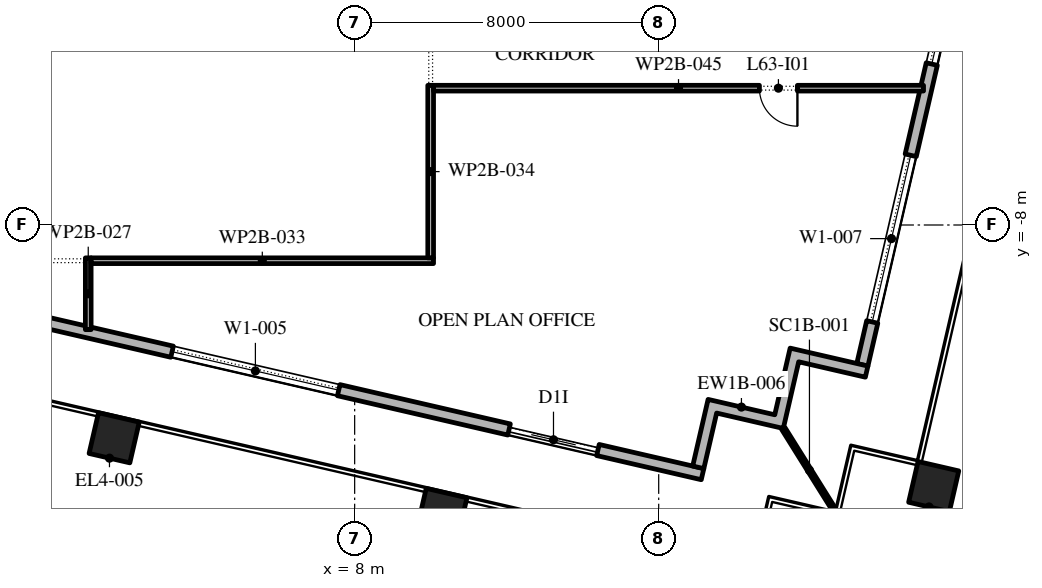
"""IFC4 building model, lengths in metres.
Left out: names, types, materials, properties, quantities, classifications, styles, units other than length and angle.
Written with IfcOpenShell. Run it as: python <this file> out.ifc"""

import sys

from ifc_helpers import new_model, si_unit, direction, frame, frame_2d, origin, origin_2d, place, context, subcontext, project, spatial, polyline, rectangle, outline, extrude, element, fill, save


model = new_model("IFC4")
c1 = context("Model", 3, precision=1e-05, world=origin(), true_north=direction((0.0, 1.0)))
c2 = subcontext(c1, "Body", "Model", "MODEL_VIEW")
j1 = project(units=[si_unit("LENGTHUNIT", "METRE"), si_unit("PLANEANGLEUNIT", "RADIAN")], contexts=[c1])
p1 = place(None, origin())
s1 = spatial("IfcSite", under=j1, at=p1, CompositionType="ELEMENT")
p2 = place(p1, origin())
s2 = spatial("IfcBuilding", under=s1, at=p2, CompositionType="ELEMENT")
p3 = place(p2, frame((0.0, 0.0, 289.2)))
s3 = spatial("IfcBuildingStorey", under=s2, at=p3, CompositionType="ELEMENT", Elevation=289.2)
for number, where, z_axis, x_axis in (
    (1, (1.672, -13.599, 0.0), (0.0, 0.0, 1.0), (0.974, -0.225, 0.0)),
    (2, (10.295, -15.59, 0.0), (0.0, 0.0, 1.0), (0.974, -0.225, 0.0)),
    (3, (23.236, -14.883, 0.0), (0.0, 0.0, 1.0), (0.974, -0.225, 0.0)),
):
    element("IfcColumn", number, at=place(p3, frame(where, z_axis=z_axis, x_axis=x_axis)), inside=s3, PredefinedType="COLUMN", context=c2, shape_type="SweptSolid", body=[
        extrude(rectangle(XDim=1.1, YDim=1.1, at=origin_2d()), origin(), (0.0, 0.0, 1.0), 4.2),
    ])
p4 = place(p3, frame((-29.616, -3.758, 0.0), z_axis=(0.0, 0.0, 1.0), x_axis=(0.974370532314, -0.224949029246, 0.0)))
e4 = element("IfcWall", 4, at=p4, inside=s3, PredefinedType="STANDARD", context=c2, shape_type="SweptSolid", body=[
    extrude(rectangle(XDim=48.0, YDim=0.3, at=frame_2d((24.0, 0.0))), origin(), (0.0, 0.0, 1.0), 3.95),
])
p5 = place(p4, frame((1.625, 0.0, 0.45)))
e5 = element("IfcOpeningElement", 5, at=p5, cuts=e4, PredefinedType="OPENING", context=c2, shape_type="SweptSolid", body=[
    extrude(rectangle(XDim=4.5, YDim=3.05, at=frame_2d((2.25, 1.525))), frame((0.0, 0.16, 0.0), z_axis=(0.0, -1.0, 0.0), x_axis=(1.0, 0.0, 0.0)), (0.0, 0.0, 1.0), 0.32),
])
p6 = place(p4, frame((10.575, 0.0, 0.0)))
e6 = element("IfcOpeningElement", 6, at=p6, cuts=e4, PredefinedType="OPENING", context=c2, shape_type="SweptSolid", body=[
    extrude(rectangle(XDim=2.4, YDim=3.5, at=frame_2d((1.2, 1.75))), frame((0.0, 0.16, 0.0), z_axis=(0.0, -1.0, 0.0), x_axis=(1.0, 0.0, 0.0)), (0.0, 0.0, 1.0), 0.32),
])
p7 = place(p4, frame((17.575, 0.0, 0.45)))
e7 = element("IfcOpeningElement", 7, at=p7, cuts=e4, PredefinedType="OPENING", context=c2, shape_type="SweptSolid", body=[
    extrude(rectangle(XDim=4.5, YDim=3.05, at=frame_2d((2.25, 1.525))), frame((0.0, 0.16, 0.0), z_axis=(0.0, -1.0, 0.0), x_axis=(1.0, 0.0, 0.0)), (0.0, 0.0, 1.0), 0.32),
])
p8 = place(p4, frame((25.625, 0.0, 0.45)))
e8 = element("IfcOpeningElement", 8, at=p8, cuts=e4, PredefinedType="OPENING", context=c2, shape_type="SweptSolid", body=[
    extrude(rectangle(XDim=4.5, YDim=2.9, at=frame_2d((2.25, 1.45))), frame((0.0, 0.16, 0.0), z_axis=(0.0, -1.0, 0.0), x_axis=(1.0, 0.0, 0.0)), (0.0, 0.0, 1.0), 0.32),
])
p9 = place(p4, frame((33.675, 0.0, 0.45)))
e9 = element("IfcOpeningElement", 9, at=p9, cuts=e4, PredefinedType="OPENING", context=c2, shape_type="SweptSolid", body=[
    extrude(rectangle(XDim=4.5, YDim=3.05, at=frame_2d((2.25, 1.525))), frame((0.0, 0.16, 0.0), z_axis=(0.0, -1.0, 0.0), x_axis=(1.0, 0.0, 0.0)), (0.0, 0.0, 1.0), 0.32),
])
p10 = place(p4, frame((42.775, 0.0, 0.0)))
e10 = element("IfcOpeningElement", 10, at=p10, cuts=e4, PredefinedType="OPENING", context=c2, shape_type="SweptSolid", body=[
    extrude(rectangle(XDim=2.4, YDim=3.15, at=frame_2d((1.2, 1.575))), frame((0.0, 0.16, 0.0), z_axis=(0.0, -1.0, 0.0), x_axis=(1.0, 0.0, 0.0)), (0.0, 0.0, 1.0), 0.32),
])
p11 = place(p3, frame((21.359, -11.678, 0.0), z_axis=(0.0, 0.0, 1.0), x_axis=(0.224949198343, 0.974370493275, 0.0)))
e11 = element("IfcWall", 11, at=p11, inside=s3, PredefinedType="STANDARD", context=c2, shape_type="SweptSolid", body=[
    extrude(rectangle(XDim=49.5, YDim=0.3, at=frame_2d((24.75, 0.0))), origin(), (0.0, 0.0, 1.0), 3.95),
])
p12 = place(p11, frame((1.157, 0.0, 0.45)))
e12 = element("IfcOpeningElement", 12, at=p12, cuts=e11, PredefinedType="OPENING", context=c2, shape_type="SweptSolid", body=[
    extrude(rectangle(XDim=4.5, YDim=3.05, at=frame_2d((2.25, 1.525))), frame((0.0, 0.16, 0.0), z_axis=(0.0, -1.0, 0.0), x_axis=(1.0, 0.0, 0.0)), (0.0, 0.0, 1.0), 0.32),
])
p13 = place(p11, frame((8.121, 0.0, 0.45)))
e13 = element("IfcOpeningElement", 13, at=p13, cuts=e11, PredefinedType="OPENING", context=c2, shape_type="SweptSolid", body=[
    extrude(rectangle(XDim=4.5, YDim=3.05, at=frame_2d((2.25, 1.525))), frame((0.0, 0.16, 0.0), z_axis=(0.0, -1.0, 0.0), x_axis=(1.0, 0.0, 0.0)), (0.0, 0.0, 1.0), 0.32),
])
p14 = place(p11, frame((15.236, 0.0, 0.45)))
e14 = element("IfcOpeningElement", 14, at=p14, cuts=e11, PredefinedType="OPENING", context=c2, shape_type="SweptSolid", body=[
    extrude(rectangle(XDim=4.5, YDim=3.05, at=frame_2d((2.25, 1.525))), frame((0.0, 0.16, 0.0), z_axis=(0.0, -1.0, 0.0), x_axis=(1.0, 0.0, 0.0)), (0.0, 0.0, 1.0), 0.32),
])
p15 = place(p11, frame((22.35, 0.0, 0.45)))
e15 = element("IfcOpeningElement", 15, at=p15, cuts=e11, PredefinedType="OPENING", context=c2, shape_type="SweptSolid", body=[
    extrude(rectangle(XDim=4.5, YDim=3.0, at=frame_2d((2.25, 1.5))), frame((0.0, 0.16, 0.0), z_axis=(0.0, -1.0, 0.0), x_axis=(1.0, 0.0, 0.0)), (0.0, 0.0, 1.0), 0.32),
])
p16 = place(p11, frame((29.464, 0.0, 0.45)))
e16 = element("IfcOpeningElement", 16, at=p16, cuts=e11, PredefinedType="OPENING", context=c2, shape_type="SweptSolid", body=[
    extrude(rectangle(XDim=4.5, YDim=2.9, at=frame_2d((2.25, 1.45))), frame((0.0, 0.16, 0.0), z_axis=(0.0, -1.0, 0.0), x_axis=(1.0, 0.0, 0.0)), (0.0, 0.0, 1.0), 0.32),
])
p17 = place(p11, frame((37.628, 0.0, 0.0)))
e17 = element("IfcOpeningElement", 17, at=p17, cuts=e11, PredefinedType="OPENING", context=c2, shape_type="SweptSolid", body=[
    extrude(rectangle(XDim=2.4, YDim=3.275, at=frame_2d((1.2, 1.637))), frame((0.0, 0.16, 0.0), z_axis=(0.0, -1.0, 0.0), x_axis=(1.0, 0.0, 0.0)), (0.0, 0.0, 1.0), 0.32),
])
p18 = place(p11, frame((43.693, 0.0, 0.45)))
e18 = element("IfcOpeningElement", 18, at=p18, cuts=e11, PredefinedType="OPENING", context=c2, shape_type="SweptSolid", body=[
    extrude(rectangle(XDim=4.5, YDim=3.05, at=frame_2d((2.25, 1.525))), frame((0.0, 0.16, 0.0), z_axis=(0.0, -1.0, 0.0), x_axis=(1.0, 0.0, 0.0)), (0.0, 0.0, 1.0), 0.32),
])
p19 = place(p3, origin())
e19 = element("IfcWall", 19, at=p19, inside=s3, PredefinedType="STANDARD", context=c2, shape_type="SweptSolid", body=[
    extrude(outline(polyline([(19.054, -12.993), (19.459, -11.24), (21.505, -11.712), (21.438, -12.004), (19.684, -11.599), (19.279, -13.353), (17.525, -12.948), (17.188, -14.41), (16.895, -14.342), (17.3, -12.588), (19.054, -12.993)])), origin(), (0.0, 0.0, 1.0), 3.95),
])
p20 = place(p3, frame((19.279, -13.353, -0.05), z_axis=(0.0, 0.0, 1.0), x_axis=(0.529914407191, -0.848051131154, 0.0)))
e20 = element("IfcWall", 20, at=p20, inside=s3, PredefinedType="STANDARD", context=c2, shape_type="SweptSolid", body=[
    extrude(rectangle(XDim=2.596, YDim=0.1, at=frame_2d((1.298, 0.0))), origin(), (0.0, 0.0, 1.0), 4.0),
])
p21 = place(p3, frame((0.99, -8.865, 0.0), z_axis=(0.0, 0.0, 1.0), x_axis=(0.0, -1.0, 0.0)))
e21 = element("IfcWall", 21, at=p21, inside=s3, PredefinedType="PARTITIONING", context=c2, shape_type="SweptSolid", body=[
    extrude(rectangle(XDim=1.888, YDim=0.15, at=frame_2d((0.944, 0.0))), origin(), (0.0, 0.0, 1.0), 3.95),
])
p22 = place(p3, frame((10.075, -8.94, 0.0), z_axis=(0.0, 0.0, 1.0), x_axis=(-1.0, 0.0, 0.0)))
e22 = element("IfcWall", 22, at=p22, inside=s3, PredefinedType="PARTITIONING", context=c2, shape_type="SweptSolid", body=[
    extrude(rectangle(XDim=9.01, YDim=0.15, at=frame_2d((4.505, 0.0))), origin(), (0.0, 0.0, 1.0), 3.95),
])
p23 = place(p3, frame((10.0, -4.325, 0.0), z_axis=(0.0, 0.0, 1.0), x_axis=(0.0, -1.0, 0.0)))
e23 = element("IfcWall", 23, at=p23, inside=s3, PredefinedType="PARTITIONING", context=c2, shape_type="SweptSolid", body=[
    extrude(rectangle(XDim=4.54, YDim=0.15, at=frame_2d((2.27, 0.0))), origin(), (0.0, 0.0, 1.0), 3.95),
])
p24 = place(p3, frame((22.968, -4.4, 0.0), z_axis=(0.0, 0.0, 1.0), x_axis=(-1.0, 0.0, 0.0)))
e24 = element("IfcWall", 24, at=p24, inside=s3, PredefinedType="PARTITIONING", context=c2, shape_type="SweptSolid", body=[
    extrude(rectangle(XDim=12.893, YDim=0.15, at=frame_2d((6.447, 0.0))), origin(), (0.0, 0.0, 1.0), 3.95),
])
p25 = place(p24, frame((3.318, 0.0, 0.0)))
e25 = element("IfcOpeningElement", 25, at=p25, cuts=e24, PredefinedType="OPENING", context=c2, shape_type="SweptSolid", body=[
    extrude(rectangle(XDim=1.0, YDim=2.1, at=frame_2d((0.5, 1.05))), frame((0.0, 0.085, 0.0), z_axis=(0.0, -1.0, 0.0), x_axis=(1.0, 0.0, 0.0)), (0.0, 0.0, 1.0), 0.17),
])
p26 = place(p9, origin())
e26 = element("IfcWindow", 26, at=p26, inside=s3, PartitioningType="DOUBLE_PANEL_VERTICAL", PredefinedType="WINDOW", context=c2, shape_type="SweptSolid", body=[
    extrude(rectangle(XDim=4.5, YDim=3.05, at=frame_2d((2.25, 1.525))), frame((0.0, 0.03, 0.0), z_axis=(0.0, -1.0, 0.0), x_axis=(1.0, 0.0, 0.0)), (0.0, 0.0, 1.0), 0.06),
])
fill(e9, e26)
p27 = place(p10, origin())
e27 = element("IfcDoor", 27, at=p27, inside=s3, OperationType="DOUBLE_DOOR_SLIDING", PredefinedType="DOOR", context=c2, shape_type="SweptSolid", body=[
    extrude(rectangle(XDim=2.4, YDim=3.15, at=frame_2d((1.2, 1.575))), frame((0.0, 0.025, 0.0), z_axis=(0.0, -1.0, 0.0), x_axis=(1.0, 0.0, 0.0)), (0.0, 0.0, 1.0), 0.05),
])
fill(e10, e27)
p28 = place(p12, origin())
e28 = element("IfcWindow", 28, at=p28, inside=s3, PartitioningType="DOUBLE_PANEL_VERTICAL", PredefinedType="WINDOW", context=c2, shape_type="SweptSolid", body=[
    extrude(rectangle(XDim=4.5, YDim=3.05, at=frame_2d((2.25, 1.525))), frame((0.0, 0.03, 0.0), z_axis=(0.0, -1.0, 0.0), x_axis=(1.0, 0.0, 0.0)), (0.0, 0.0, 1.0), 0.06),
])
fill(e12, e28)
p29 = place(p13, origin())
e29 = element("IfcWindow", 29, at=p29, inside=s3, PartitioningType="DOUBLE_PANEL_VERTICAL", PredefinedType="WINDOW", context=c2, shape_type="SweptSolid", body=[
    extrude(rectangle(XDim=4.5, YDim=3.05, at=frame_2d((2.25, 1.525))), frame((0.0, 0.03, 0.0), z_axis=(0.0, -1.0, 0.0), x_axis=(1.0, 0.0, 0.0)), (0.0, 0.0, 1.0), 0.06),
])
fill(e13, e29)
p30 = place(p25, origin())
e30 = element("IfcDoor", 30, at=p30, inside=s3, OperationType="SINGLE_SWING_RIGHT", PredefinedType="DOOR", context=c2, shape_type="SweptSolid", body=[
    extrude(rectangle(XDim=1.0, YDim=2.1, at=frame_2d((0.5, 1.05))), frame((0.0, 0.025, 0.0), z_axis=(0.0, -1.0, 0.0), x_axis=(1.0, 0.0, 0.0)), (0.0, 0.0, 1.0), 0.05),
])
fill(e25, e30)
save(model, sys.argv[1])
